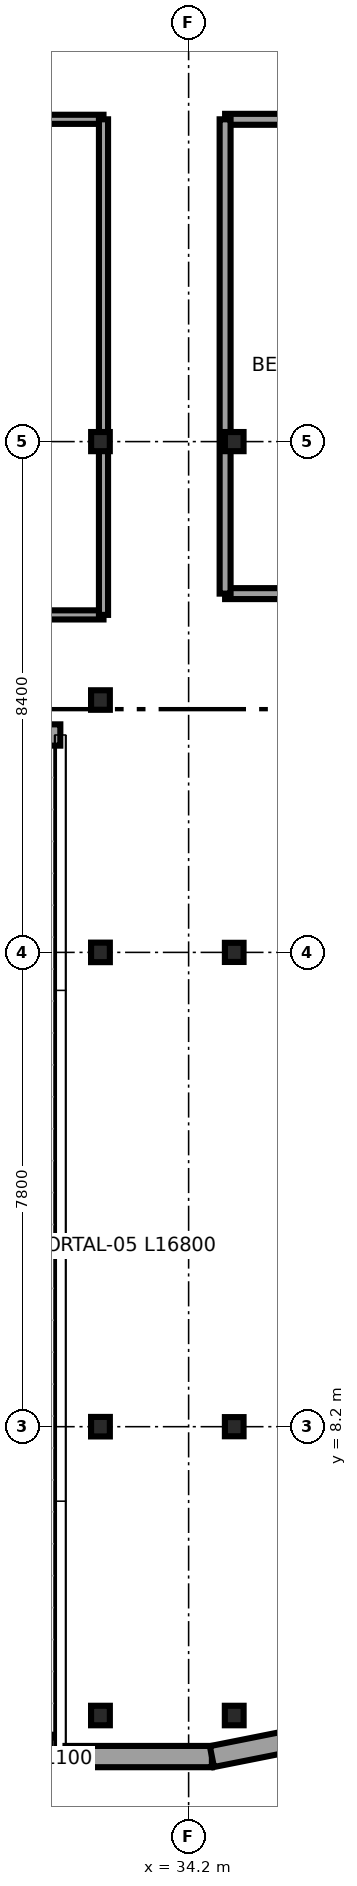
"""IFC4 building model, lengths in metres.
Left out: names, types, materials, properties, quantities, classifications, styles, units other than length and angle.
Written with IfcOpenShell. Run it as: python <this file> out.ifc"""

import sys

from ifc_helpers import new_model, si_unit, direction, frame, frame_2d, origin, origin_2d, place, context, subcontext, project, spatial, rectangle, i_section, extrude, source, transform, mapped, element, save


model = new_model("IFC4")
c1 = context("Model", 3, precision=1e-05, world=origin(), true_north=direction((0.0, 1.0)))
c2 = subcontext(c1, "Body", "Model", "MODEL_VIEW")
j1 = project(units=[si_unit("LENGTHUNIT", "METRE"), si_unit("PLANEANGLEUNIT", "RADIAN")], contexts=[c1])
p1 = place(None, origin())
s1 = spatial("IfcSite", under=j1, at=p1, CompositionType="ELEMENT")
p2 = place(p1, origin())
s2 = spatial("IfcBuilding", under=s1, at=p2, CompositionType="ELEMENT")
p3 = place(p2, frame((0.0, 0.0, 241.65)))
s3 = spatial("IfcBuildingStorey", under=s2, at=p3, CompositionType="ELEMENT", Elevation=241.65)
m1 = source(origin(), c2, "Body", "SweptSolid", [
    extrude(i_section(OverallWidth=0.309, OverallDepth=0.321, WebThickness=0.014, FlangeThickness=0.022, FilletRadius=0.017, at=origin_2d()), origin(), (0.0, 0.0, 1.0), 3.55),
])
for number, where, z_axis, x_axis in (
    (1, (32.75, 3.45, 0.0), (0.0, 0.0, 1.0), (1.0, 0.0, 0.0)),
    (2, (32.75, 8.2, 0.0), (0.0, 0.0, 1.0), (1.0, 0.0, 0.0)),
    (3, (32.75, 16.0, 0.0), (0.0, 0.0, 1.0), (1.0, 0.0, 0.0)),
    (4, (34.95, 3.45, 0.0), (0.0, 0.0, 1.0), (1.0, 0.0, 0.0)),
):
    element("IfcColumn", number, at=place(p3, frame(where, z_axis=z_axis, x_axis=x_axis)), inside=s3, PredefinedType="COLUMN", context=c2, shape_type="MappedRepresentation", body=[
        mapped(m1, transform((0.0, 0.0, 0.0), x_axis=(1.0, 0.0, 0.0), y_axis=(0.0, 1.0, 0.0), z_axis=(0.0, 0.0, 1.0), scale=1.0)),
    ])
m2 = source(origin(), c2, "Body", "SweptSolid", [
    extrude(i_section(OverallWidth=0.307, OverallDepth=0.315, WebThickness=0.012, FlangeThickness=0.019, FilletRadius=0.017, at=origin_2d()), origin(), (0.0, 0.0, 1.0), 3.55),
])
for number, where, z_axis, x_axis in (
    (5, (34.95, 8.2, 0.0), (0.0, 0.0, 1.0), (1.0, 0.0, 0.0)),
    (6, (34.95, 16.0, 0.0), (0.0, 0.0, 1.0), (1.0, 0.0, 0.0)),
    (7, (32.75, 24.4, 0.0), (0.0, 0.0, 1.0), (1.0, 0.0, 0.0)),
    (8, (34.95, 24.4, 0.0), (0.0, 0.0, 1.0), (1.0, 0.0, 0.0)),
):
    element("IfcColumn", number, at=place(p3, frame(where, z_axis=z_axis, x_axis=x_axis)), inside=s3, PredefinedType="COLUMN", context=c2, shape_type="MappedRepresentation", body=[
        mapped(m2, transform((0.0, 0.0, 0.0), x_axis=(1.0, 0.0, 0.0), y_axis=(0.0, 1.0, 0.0), z_axis=(0.0, 0.0, 1.0), scale=1.0)),
    ])
p4 = place(p3, frame((32.75, 20.15, 0.0), z_axis=(0.0, 0.0, 1.0), x_axis=(1.0, 0.0, 0.0)))
e9 = element("IfcColumn", 9, at=p4, inside=s3, PredefinedType="COLUMN", context=c2, shape_type="MappedRepresentation", body=[
    mapped(m1, transform((0.0, 0.0, 0.0), x_axis=(1.0, 0.0, 0.0), y_axis=(0.0, 1.0, 0.0), z_axis=(0.0, 0.0, 1.0), scale=1.0)),
])
p5 = place(p3, frame((15.025, 19.575, 0.0), z_axis=(0.0, 0.0, 1.0), x_axis=(1.0, 0.0, 0.0)))
e10 = element("IfcWall", 10, at=p5, inside=s3, PredefinedType="SOLIDWALL", context=c2, shape_type="SweptSolid", body=[
    extrude(rectangle(XDim=17.065, YDim=0.35, at=frame_2d((8.533, 0.0))), origin(), (0.0, 0.0, 1.0), 3.37),
])
p6 = place(p5, frame((1.894, 0.0, 0.68)))
e11 = element("IfcOpeningElement", 11, at=p6, cuts=e10, PredefinedType="OPENING", context=c2, shape_type="SweptSolid", body=[
    extrude(rectangle(XDim=2.7, YDim=1.95, at=frame_2d((1.35, 0.975))), frame((0.0, 0.185, 0.0), z_axis=(0.0, -1.0, 0.0), x_axis=(1.0, 0.0, 0.0)), (0.0, 0.0, 1.0), 0.37),
])
p7 = place(p5, frame((7.183, 0.0, 0.68)))
e12 = element("IfcOpeningElement", 12, at=p7, cuts=e10, PredefinedType="OPENING", context=c2, shape_type="SweptSolid", body=[
    extrude(rectangle(XDim=2.7, YDim=1.95, at=frame_2d((1.35, 0.975))), frame((0.0, 0.185, 0.0), z_axis=(0.0, -1.0, 0.0), x_axis=(1.0, 0.0, 0.0)), (0.0, 0.0, 1.0), 0.37),
])
p8 = place(p5, frame((12.471, 0.0, 0.68)))
e13 = element("IfcOpeningElement", 13, at=p8, cuts=e10, PredefinedType="OPENING", context=c2, shape_type="SweptSolid", body=[
    extrude(rectangle(XDim=2.7, YDim=1.95, at=frame_2d((1.35, 0.975))), frame((0.0, 0.185, 0.0), z_axis=(0.0, -1.0, 0.0), x_axis=(1.0, 0.0, 0.0)), (0.0, 0.0, 1.0), 0.37),
])
p9 = place(p3, frame((32.175, 2.775, 0.0), z_axis=(0.0, 0.0, 1.0), x_axis=(1.0, 0.0, 0.0)))
e14 = element("IfcWall", 14, at=p9, inside=s3, PredefinedType="SOLIDWALL", context=c2, shape_type="SweptSolid", body=[
    extrude(rectangle(XDim=2.408, YDim=0.35, at=frame_2d((1.204, 0.0))), origin(), (0.0, 0.0, 1.0), 3.37),
])
p10 = place(p3, frame((34.583, 2.775, 0.0), z_axis=(0.0, 0.0, 1.0), x_axis=(0.980794424524, 0.195044345786, 0.0)))
e15 = element("IfcWall", 15, at=p10, inside=s3, PredefinedType="SOLIDWALL", context=c2, shape_type="SweptSolid", body=[
    extrude(rectangle(XDim=1.665, YDim=0.35, at=frame_2d((0.833, 0.0))), origin(), (0.0, 0.0, 1.0), 2.16),
])
p11 = place(p3, frame((22.4, 21.55, 0.0), z_axis=(0.0, 0.0, 1.0), x_axis=(1.0, 0.0, 0.0)))
e16 = element("IfcWall", 16, at=p11, inside=s3, PredefinedType="PARTITIONING", context=c2, shape_type="SweptSolid", body=[
    extrude(rectangle(XDim=10.4, YDim=0.15, at=frame_2d((5.2, 0.0))), origin(), (0.0, 0.0, 1.0), 3.37),
])
p12 = place(p11, frame((4.075, 0.0, 0.0)))
e17 = element("IfcOpeningElement", 17, at=p12, cuts=e16, PredefinedType="OPENING", context=c2, shape_type="SweptSolid", body=[
    extrude(rectangle(XDim=1.65, YDim=2.15, at=frame_2d((0.825, 1.075))), frame((0.0, 0.085, 0.0), z_axis=(0.0, -1.0, 0.0), x_axis=(1.0, 0.0, 0.0)), (0.0, 0.0, 1.0), 0.17),
])
p13 = place(p3, frame((22.4, 29.7, 0.0), z_axis=(0.0, 0.0, 1.0), x_axis=(1.0, 0.0, 0.0)))
e18 = element("IfcWall", 18, at=p13, inside=s3, PredefinedType="PARTITIONING", context=c2, shape_type="SweptSolid", body=[
    extrude(rectangle(XDim=10.4, YDim=0.15, at=frame_2d((5.2, 0.0))), origin(), (0.0, 0.0, 1.0), 3.37),
])
p14 = place(p3, frame((32.8, 21.55, 0.0), z_axis=(0.0, 0.0, 1.0), x_axis=(0.0, 1.0, 0.0)))
e19 = element("IfcWall", 19, at=p14, inside=s3, PredefinedType="PARTITIONING", context=c2, shape_type="SweptSolid", body=[
    extrude(rectangle(XDim=8.15, YDim=0.15, at=frame_2d((4.075, 0.0))), origin(), (0.0, 0.0, 1.0), 2.16),
])
p15 = place(p3, frame((34.8, 21.9, 0.0), z_axis=(0.0, 0.0, 1.0), x_axis=(1.0, 0.0, 0.0)))
e20 = element("IfcWall", 20, at=p15, inside=s3, PredefinedType="PARTITIONING", context=c2, shape_type="SweptSolid", body=[
    extrude(rectangle(XDim=3.795, YDim=0.18, at=frame_2d((1.897, 0.0))), origin(), (0.0, 0.0, 1.0), 3.37),
])
p16 = place(p3, frame((34.8, 29.7, 0.0), z_axis=(0.0, 0.0, 1.0), x_axis=(1.0, 0.0, 0.0)))
e21 = element("IfcWall", 21, at=p16, inside=s3, PredefinedType="PARTITIONING", context=c2, shape_type="SweptSolid", body=[
    extrude(rectangle(XDim=3.795, YDim=0.18, at=frame_2d((1.897, 0.0))), origin(), (0.0, 0.0, 1.0), 3.37),
])
p17 = place(p16, frame((1.073, 0.0, 0.0)))
e22 = element("IfcOpeningElement", 22, at=p17, cuts=e21, PredefinedType="OPENING", context=c2, shape_type="SweptSolid", body=[
    extrude(rectangle(XDim=1.65, YDim=2.15, at=frame_2d((0.825, 1.075))), frame((0.0, 0.1, 0.0), z_axis=(0.0, -1.0, 0.0), x_axis=(1.0, 0.0, 0.0)), (0.0, 0.0, 1.0), 0.2),
])
p18 = place(p3, frame((34.8, 21.9, 0.0), z_axis=(0.0, 0.0, 1.0), x_axis=(0.0, 1.0, 0.0)))
e23 = element("IfcWall", 23, at=p18, inside=s3, PredefinedType="PARTITIONING", context=c2, shape_type="SweptSolid", body=[
    extrude(rectangle(XDim=7.8, YDim=0.18, at=frame_2d((3.9, 0.0))), origin(), (0.0, 0.0, 1.0), 2.16),
])
save(model, sys.argv[1])
